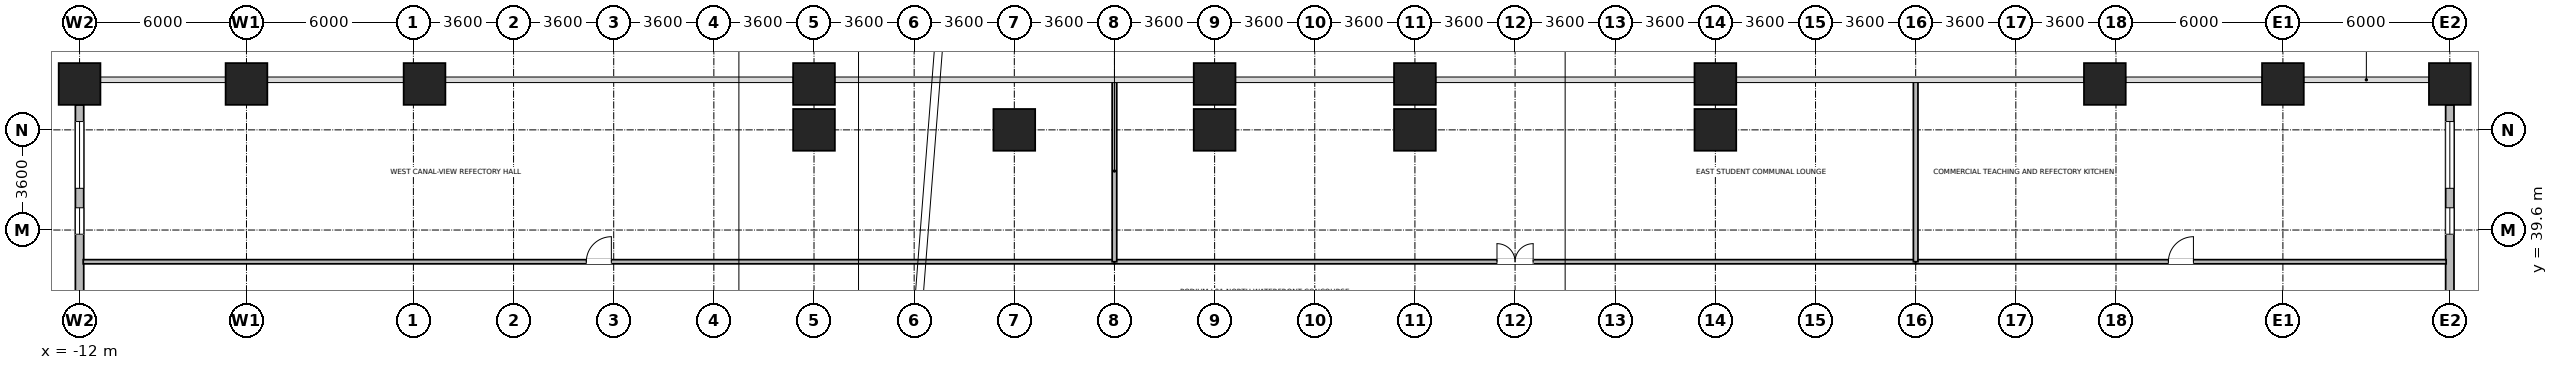
"""IFC4 building model, lengths in metres.
Left out: names, types, materials, properties, quantities, classifications, styles, units other than length and angle.
Written with IfcOpenShell. Run it as: python <this file> out.ifc"""

import sys

from ifc_helpers import new_model, si_unit, direction, frame, frame_2d, origin, origin_2d, place, context, subcontext, project, spatial, rectangle, extrude, source, transform, mapped, element, fill, save


model = new_model("IFC4")
c1 = context("Model", 3, precision=1e-05, world=origin(), true_north=direction((0.0, 1.0)))
c2 = subcontext(c1, "Body", "Model", "MODEL_VIEW")
j1 = project(units=[si_unit("LENGTHUNIT", "METRE"), si_unit("PLANEANGLEUNIT", "RADIAN")], contexts=[c1])
p1 = place(None, origin())
s1 = spatial("IfcSite", under=j1, at=p1, CompositionType="ELEMENT")
p2 = place(p1, origin())
s2 = spatial("IfcBuilding", under=s1, at=p2, CompositionType="ELEMENT")
p3 = place(p2, frame((0.0, 0.0, 5.4)))
s3 = spatial("IfcBuildingStorey", under=s2, at=p3, CompositionType="ELEMENT", Elevation=5.4)
m1 = source(origin(), c2, "Body", "SweptSolid", [
    extrude(rectangle(XDim=1.5, YDim=1.5, at=origin_2d()), origin(), (0.0, 0.0, 1.0), 4.8),
])
for number, where, z_axis, x_axis in (
    (1, (14.4, 43.2, 0.0), (0.0, 0.0, 1.0), (1.0, 0.0, 0.0)),
    (2, (21.6, 43.2, 0.0), (0.0, 0.0, 1.0), (1.0, 0.0, 0.0)),
    (3, (28.8, 43.2, 0.0), (0.0, 0.0, 1.0), (1.0, 0.0, 0.0)),
    (4, (36.0, 43.2, 0.0), (0.0, 0.0, 1.0), (1.0, 0.0, 0.0)),
    (5, (46.8, 43.2, 0.0), (0.0, 0.0, 1.0), (1.0, 0.0, 0.0)),
    (6, (0.4, 44.85, 0.0), (0.0, 0.0, 1.0), (1.0, 0.0, 0.0)),
    (7, (14.4, 44.85, 0.0), (0.0, 0.0, 1.0), (1.0, 0.0, 0.0)),
    (8, (28.8, 44.85, 0.0), (0.0, 0.0, 1.0), (1.0, 0.0, 0.0)),
    (9, (36.0, 44.85, 0.0), (0.0, 0.0, 1.0), (1.0, 0.0, 0.0)),
    (10, (46.8, 44.85, 0.0), (0.0, 0.0, 1.0), (1.0, 0.0, 0.0)),
    (11, (60.8, 44.85, 0.0), (0.0, 0.0, 1.0), (1.0, 0.0, 0.0)),
    (12, (-12.0, 44.85, 0.0), (0.0, 0.0, 1.0), (1.0, 0.0, 0.0)),
    (13, (-6.0, 44.85, 0.0), (0.0, 0.0, 1.0), (1.0, 0.0, 0.0)),
    (14, (67.2, 44.85, 0.0), (0.0, 0.0, 1.0), (1.0, 0.0, 0.0)),
    (15, (73.2, 44.85, 0.0), (0.0, 0.0, 1.0), (1.0, 0.0, 0.0)),
):
    element("IfcColumn", number, at=place(p3, frame(where, z_axis=z_axis, x_axis=x_axis)), inside=s3, PredefinedType="COLUMN", context=c2, shape_type="MappedRepresentation", body=[
        mapped(m1, transform((0.0, 0.0, 0.0), x_axis=(1.0, 0.0, 0.0), y_axis=(0.0, 1.0, 0.0), z_axis=(0.0, 0.0, 1.0), scale=1.0)),
    ])
p4 = place(p3, frame((73.2, 44.099, 0.0), z_axis=(0.0, 0.0, 1.0), x_axis=(0.0, -1.0, 0.0)))
e16 = element("IfcWall", 16, at=p4, inside=s3, PredefinedType="STANDARD", context=c2, shape_type="SweptSolid", body=[
    extrude(rectangle(XDim=7.198, YDim=0.3, at=frame_2d((3.599, 0.0))), origin(), (0.0, 0.0, 1.0), 3.9),
])
p5 = place(p4, frame((0.6, 0.0, 0.9)))
e17 = element("IfcOpeningElement", 17, at=p5, cuts=e16, PredefinedType="OPENING", context=c2, shape_type="SweptSolid", body=[
    extrude(rectangle(XDim=2.4, YDim=2.5, at=frame_2d((1.2, 1.25))), frame((0.0, 0.16, 0.0), z_axis=(0.0, -1.0, 0.0), x_axis=(1.0, 0.0, 0.0)), (0.0, 0.0, 1.0), 0.32),
])
p6 = place(p4, frame((3.7, 0.0, 0.9)))
e18 = element("IfcOpeningElement", 18, at=p6, cuts=e16, PredefinedType="OPENING", context=c2, shape_type="SweptSolid", body=[
    extrude(rectangle(XDim=0.95, YDim=1.75, at=frame_2d((0.475, 0.875))), frame((0.0, 0.16, 0.0), z_axis=(0.0, -1.0, 0.0), x_axis=(1.0, 0.0, 0.0)), (0.0, 0.0, 1.0), 0.32),
])
p7 = place(p3, frame((-12.0, 36.901, 0.0), z_axis=(0.0, 0.0, 1.0), x_axis=(0.0, 1.0, 0.0)))
e19 = element("IfcWall", 19, at=p7, inside=s3, PredefinedType="STANDARD", context=c2, shape_type="SweptSolid", body=[
    extrude(rectangle(XDim=7.198, YDim=0.3, at=frame_2d((3.599, 0.0))), origin(), (0.0, 0.0, 1.0), 3.9),
])
p8 = place(p7, frame((4.198, 0.0, 0.9)))
e20 = element("IfcOpeningElement", 20, at=p8, cuts=e19, PredefinedType="OPENING", context=c2, shape_type="SweptSolid", body=[
    extrude(rectangle(XDim=2.4, YDim=2.5, at=frame_2d((1.2, 1.25))), frame((0.0, 0.16, 0.0), z_axis=(0.0, -1.0, 0.0), x_axis=(1.0, 0.0, 0.0)), (0.0, 0.0, 1.0), 0.32),
])
p9 = place(p7, frame((2.548, 0.0, 0.9)))
e21 = element("IfcOpeningElement", 21, at=p9, cuts=e19, PredefinedType="OPENING", context=c2, shape_type="SweptSolid", body=[
    extrude(rectangle(XDim=0.95, YDim=1.75, at=frame_2d((0.475, 0.875))), frame((0.0, 0.16, 0.0), z_axis=(0.0, -1.0, 0.0), x_axis=(1.0, 0.0, 0.0)), (0.0, 0.0, 1.0), 0.32),
])
p10 = place(p3, frame((-11.868, 38.46, 0.0), z_axis=(0.0, 0.0, 1.0), x_axis=(1.0, 0.0, 0.0)))
e22 = element("IfcWall", 22, at=p10, inside=s3, PredefinedType="PARTITIONING", context=c2, shape_type="SweptSolid", body=[
    extrude(rectangle(XDim=37.068, YDim=0.15, at=frame_2d((18.534, 0.0))), origin(), (0.0, 0.0, 1.0), 4.5),
])
p11 = place(p10, frame((18.084, 0.0, 0.0)))
e23 = element("IfcOpeningElement", 23, at=p11, cuts=e22, PredefinedType="OPENING", context=c2, shape_type="SweptSolid", body=[
    extrude(rectangle(XDim=0.9, YDim=2.08, at=frame_2d((0.45, 1.04))), frame((0.0, 0.085, 0.0), z_axis=(0.0, -1.0, 0.0), x_axis=(1.0, 0.0, 0.0)), (0.0, 0.0, 1.0), 0.17),
])
p12 = place(p3, frame((25.2, 38.46, 0.0), z_axis=(0.0, 0.0, 1.0), x_axis=(1.0, 0.0, 0.0)))
e24 = element("IfcWall", 24, at=p12, inside=s3, PredefinedType="PARTITIONING", context=c2, shape_type="SweptSolid", body=[
    extrude(rectangle(XDim=28.8, YDim=0.15, at=frame_2d((14.4, 0.0))), origin(), (0.0, 0.0, 1.0), 4.5),
])
p13 = place(p12, frame((13.75, 0.0, 0.0)))
e25 = element("IfcOpeningElement", 25, at=p13, cuts=e24, PredefinedType="OPENING", context=c2, shape_type="SweptSolid", body=[
    extrude(rectangle(XDim=1.3, YDim=2.12, at=frame_2d((0.65, 1.06))), frame((0.0, 0.085, 0.0), z_axis=(0.0, -1.0, 0.0), x_axis=(1.0, 0.0, 0.0)), (0.0, 0.0, 1.0), 0.17),
])
p14 = place(p3, frame((54.0, 38.46, 0.0), z_axis=(0.0, 0.0, 1.0), x_axis=(1.0, 0.0, 0.0)))
e26 = element("IfcWall", 26, at=p14, inside=s3, PredefinedType="PARTITIONING", context=c2, shape_type="SweptSolid", body=[
    extrude(rectangle(XDim=19.068, YDim=0.15, at=frame_2d((9.534, 0.0))), origin(), (0.0, 0.0, 1.0), 4.5),
])
p15 = place(p14, frame((9.084, 0.0, 0.0)))
e27 = element("IfcOpeningElement", 27, at=p15, cuts=e26, PredefinedType="OPENING", context=c2, shape_type="SweptSolid", body=[
    extrude(rectangle(XDim=0.9, YDim=2.08, at=frame_2d((0.45, 1.04))), frame((0.0, 0.085, 0.0), z_axis=(0.0, -1.0, 0.0), x_axis=(1.0, 0.0, 0.0)), (0.0, 0.0, 1.0), 0.17),
])
for number, where, z_axis, x_axis in (
    (28, (25.2, 38.46, 0.0), (0.0, 0.0, 1.0), (0.0, 1.0, 0.0)),
    (29, (54.0, 38.46, 0.0), (0.0, 0.0, 1.0), (0.0, 1.0, 0.0)),
):
    element("IfcWall", number, at=place(p3, frame(where, z_axis=z_axis, x_axis=x_axis)), inside=s3, PredefinedType="PARTITIONING", context=c2, shape_type="SweptSolid", body=[
        extrude(rectangle(XDim=6.52, YDim=0.165, at=frame_2d((3.26, 0.0))), origin(), (0.0, 0.0, 1.0), 4.5),
    ])
p16 = place(p5, origin())
e30 = element("IfcWindow", 30, at=p16, inside=s3, PartitioningType="SINGLE_PANEL", PredefinedType="WINDOW", context=c2, shape_type="SweptSolid", body=[
    extrude(rectangle(XDim=2.4, YDim=2.5, at=frame_2d((1.2, 1.25))), frame((0.0, 0.03, 0.0), z_axis=(0.0, -1.0, 0.0), x_axis=(1.0, 0.0, 0.0)), (0.0, 0.0, 1.0), 0.06),
])
fill(e17, e30)
p17 = place(p6, origin())
e31 = element("IfcWindow", 31, at=p17, inside=s3, PartitioningType="SINGLE_PANEL", PredefinedType="WINDOW", context=c2, shape_type="SweptSolid", body=[
    extrude(rectangle(XDim=0.95, YDim=1.75, at=frame_2d((0.475, 0.875))), frame((0.0, 0.03, 0.0), z_axis=(0.0, -1.0, 0.0), x_axis=(1.0, 0.0, 0.0)), (0.0, 0.0, 1.0), 0.06),
])
fill(e18, e31)
p18 = place(p8, origin())
e32 = element("IfcWindow", 32, at=p18, inside=s3, PartitioningType="SINGLE_PANEL", PredefinedType="WINDOW", context=c2, shape_type="SweptSolid", body=[
    extrude(rectangle(XDim=2.4, YDim=2.5, at=frame_2d((1.2, 1.25))), frame((0.0, 0.03, 0.0), z_axis=(0.0, -1.0, 0.0), x_axis=(1.0, 0.0, 0.0)), (0.0, 0.0, 1.0), 0.06),
])
fill(e20, e32)
p19 = place(p9, origin())
e33 = element("IfcWindow", 33, at=p19, inside=s3, PartitioningType="SINGLE_PANEL", PredefinedType="WINDOW", context=c2, shape_type="SweptSolid", body=[
    extrude(rectangle(XDim=0.95, YDim=1.75, at=frame_2d((0.475, 0.875))), frame((0.0, 0.03, 0.0), z_axis=(0.0, -1.0, 0.0), x_axis=(1.0, 0.0, 0.0)), (0.0, 0.0, 1.0), 0.06),
])
fill(e21, e33)
p20 = place(p11, origin())
e34 = element("IfcDoor", 34, at=p20, inside=s3, OperationType="SINGLE_SWING_RIGHT", PredefinedType="DOOR", context=c2, shape_type="SweptSolid", body=[
    extrude(rectangle(XDim=0.9, YDim=2.08, at=frame_2d((0.45, 1.04))), frame((0.0, 0.025, 0.0), z_axis=(0.0, -1.0, 0.0), x_axis=(1.0, 0.0, 0.0)), (0.0, 0.0, 1.0), 0.05),
])
fill(e23, e34)
p21 = place(p13, origin())
e35 = element("IfcDoor", 35, at=p21, inside=s3, OperationType="DOUBLE_DOOR_SINGLE_SWING", PredefinedType="DOOR", context=c2, shape_type="SweptSolid", body=[
    extrude(rectangle(XDim=1.3, YDim=2.12, at=frame_2d((0.65, 1.06))), frame((0.0, 0.025, 0.0), z_axis=(0.0, -1.0, 0.0), x_axis=(1.0, 0.0, 0.0)), (0.0, 0.0, 1.0), 0.05),
])
fill(e25, e35)
p22 = place(p15, origin())
e36 = element("IfcDoor", 36, at=p22, inside=s3, OperationType="SINGLE_SWING_RIGHT", PredefinedType="DOOR", context=c2, shape_type="SweptSolid", body=[
    extrude(rectangle(XDim=0.9, YDim=2.08, at=frame_2d((0.45, 1.04))), frame((0.0, 0.025, 0.0), z_axis=(0.0, -1.0, 0.0), x_axis=(1.0, 0.0, 0.0)), (0.0, 0.0, 1.0), 0.05),
])
fill(e27, e36)
save(model, sys.argv[1])
